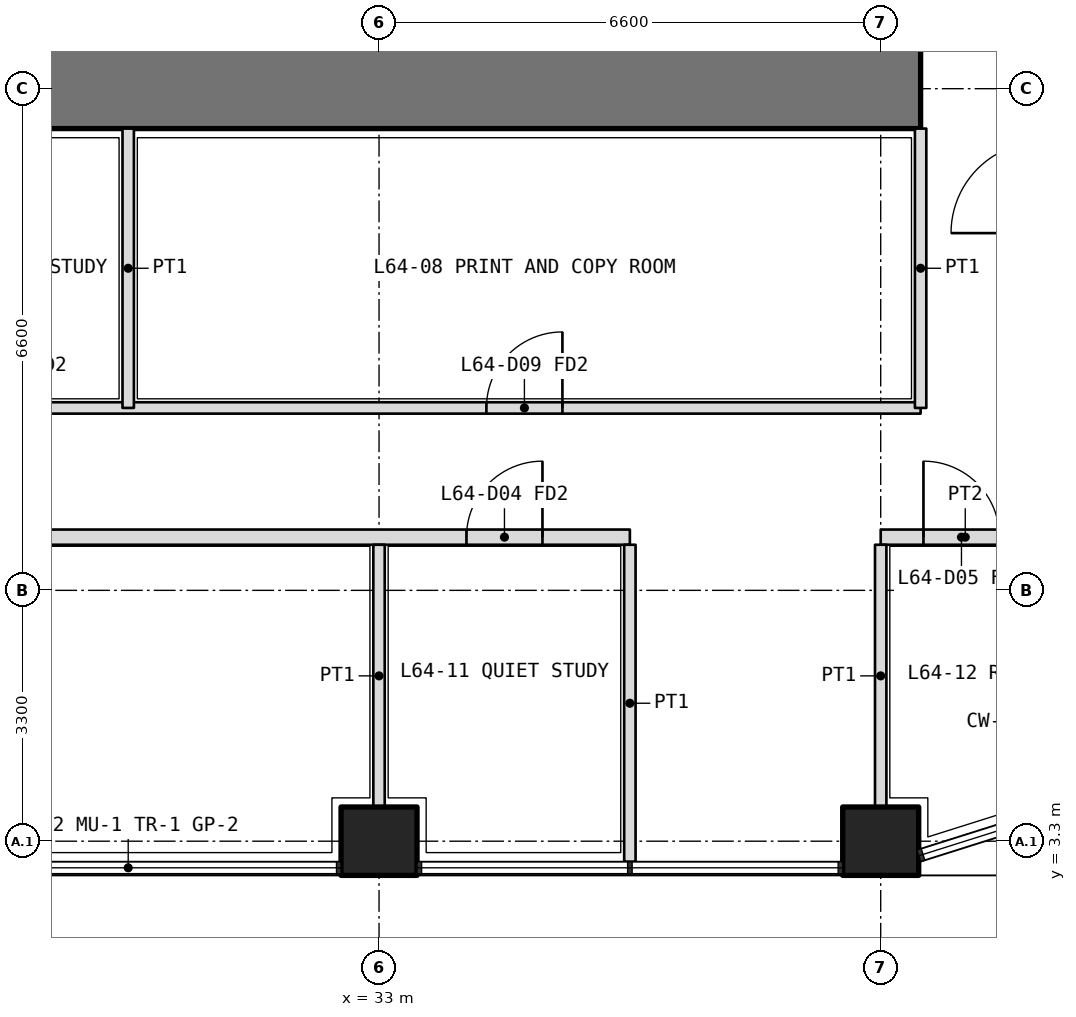
"""IFC4 building model, lengths in metres.
Left out: names, types, materials, properties, quantities, classifications, styles, units other than length and angle.
Written with IfcOpenShell. Run it as: python <this file> out.ifc"""

import sys

from ifc_helpers import new_model, si_unit, direction, frame, frame_2d, origin, origin_2d, place, context, subcontext, project, spatial, rectangle, extrude, element, fill, save


model = new_model("IFC4")
c1 = context("Model", 3, precision=1e-05, world=origin(), true_north=direction((0.0, 1.0)))
c2 = subcontext(c1, "Body", "Model", "MODEL_VIEW")
j1 = project(units=[si_unit("LENGTHUNIT", "METRE"), si_unit("PLANEANGLEUNIT", "RADIAN")], contexts=[c1])
p1 = place(None, origin())
s1 = spatial("IfcSite", under=j1, at=p1, CompositionType="ELEMENT")
p2 = place(p1, origin())
s2 = spatial("IfcBuilding", under=s1, at=p2, CompositionType="ELEMENT")
p3 = place(p2, frame((0.0, 0.0, 279.6)))
s3 = spatial("IfcBuildingStorey", under=s2, at=p3, CompositionType="ELEMENT", Elevation=279.6)
for number, where, z_axis, x_axis in (
    (1, (33.0, 3.3, 0.0), (0.0, 0.0, 1.0), (1.0, 0.0, 0.0)),
    (2, (39.6, 3.3, 0.0), (0.0, 0.0, 1.0), (1.0, 0.0, 0.0)),
):
    element("IfcColumn", number, at=place(p3, frame(where, z_axis=z_axis, x_axis=x_axis)), inside=s3, PredefinedType="COLUMN", context=c2, shape_type="SweptSolid", body=[
        extrude(rectangle(XDim=1.0, YDim=0.9, at=origin_2d()), origin(), (0.0, 0.0, 1.0), 4.2),
    ])
p4 = place(p3, frame((12.675, 13.2, 0.0), z_axis=(0.0, 0.0, 1.0), x_axis=(1.0, 0.0, 0.0)))
e3 = element("IfcWall", 3, at=p4, inside=s3, PredefinedType="SHEAR", context=c2, shape_type="SweptSolid", body=[
    extrude(rectangle(XDim=27.45, YDim=1.05, at=frame_2d((13.725, 0.0))), origin(), (0.0, 0.0, 1.0), 4.2),
])
p5 = place(p3, frame((12.675, 9.0, 0.0), z_axis=(0.0, 0.0, 1.0), x_axis=(1.0, 0.0, 0.0)))
e4 = element("IfcWall", 4, at=p5, inside=s3, PredefinedType="PARTITIONING", context=c2, shape_type="SweptSolid", body=[
    extrude(rectangle(XDim=27.45, YDim=0.15, at=frame_2d((13.725, 0.0))), origin(), (0.0, 0.0, 1.0), 3.0),
])
p6 = place(p5, frame((1.413, 0.0, 0.0)))
e5 = element("IfcOpeningElement", 5, at=p6, cuts=e4, PredefinedType="OPENING", context=c2, shape_type="SweptSolid", body=[
    extrude(rectangle(XDim=1.0, YDim=2.1, at=frame_2d((0.5, 1.05))), frame((0.0, 0.085, 0.0), z_axis=(0.0, -1.0, 0.0), x_axis=(1.0, 0.0, 0.0)), (0.0, 0.0, 1.0), 0.17),
])
p7 = place(p5, frame((8.275, 0.0, 0.0)))
e6 = element("IfcOpeningElement", 6, at=p7, cuts=e4, PredefinedType="OPENING", context=c2, shape_type="SweptSolid", body=[
    extrude(rectangle(XDim=1.0, YDim=2.1, at=frame_2d((0.5, 1.05))), frame((0.0, 0.085, 0.0), z_axis=(0.0, -1.0, 0.0), x_axis=(1.0, 0.0, 0.0)), (0.0, 0.0, 1.0), 0.17),
])
p8 = place(p5, frame((14.875, 0.0, 0.0)))
e7 = element("IfcOpeningElement", 7, at=p8, cuts=e4, PredefinedType="OPENING", context=c2, shape_type="SweptSolid", body=[
    extrude(rectangle(XDim=1.0, YDim=2.1, at=frame_2d((0.5, 1.05))), frame((0.0, 0.085, 0.0), z_axis=(0.0, -1.0, 0.0), x_axis=(1.0, 0.0, 0.0)), (0.0, 0.0, 1.0), 0.17),
])
p9 = place(p5, frame((21.738, 0.0, 0.0)))
e8 = element("IfcOpeningElement", 8, at=p9, cuts=e4, PredefinedType="OPENING", context=c2, shape_type="SweptSolid", body=[
    extrude(rectangle(XDim=1.0, YDim=2.1, at=frame_2d((0.5, 1.05))), frame((0.0, 0.085, 0.0), z_axis=(0.0, -1.0, 0.0), x_axis=(1.0, 0.0, 0.0)), (0.0, 0.0, 1.0), 0.17),
])
p10 = place(p3, frame((40.125, 12.675, 0.0), z_axis=(0.0, 0.0, 1.0), x_axis=(0.0, -1.0, 0.0)))
e9 = element("IfcWall", 9, at=p10, inside=s3, PredefinedType="PARTITIONING", context=c2, shape_type="SweptSolid", body=[
    extrude(rectangle(XDim=3.675, YDim=0.15, at=frame_2d((1.837, 0.0))), origin(), (0.0, 0.0, 1.0), 3.0),
])
p11 = place(p3, frame((29.7, 12.675, 0.0), z_axis=(0.0, 0.0, 1.0), x_axis=(0.0, -1.0, 0.0)))
e10 = element("IfcWall", 10, at=p11, inside=s3, PredefinedType="PARTITIONING", context=c2, shape_type="SweptSolid", body=[
    extrude(rectangle(XDim=3.675, YDim=0.15, at=frame_2d((1.837, 0.0))), origin(), (0.0, 0.0, 1.0), 3.9),
])
p12 = place(p3, frame((10.975, 7.3, 0.0), z_axis=(0.0, 0.0, 1.0), x_axis=(1.0, 0.0, 0.0)))
e11 = element("IfcWall", 11, at=p12, inside=s3, PredefinedType="PARTITIONING", context=c2, shape_type="SweptSolid", body=[
    extrude(rectangle(XDim=25.325, YDim=0.2, at=frame_2d((12.663, 0.0))), origin(), (0.0, 0.0, 1.0), 3.0),
])
p13 = place(p12, frame((0.562, 0.0, 0.0)))
e12 = element("IfcOpeningElement", 12, at=p13, cuts=e11, PredefinedType="OPENING", context=c2, shape_type="SweptSolid", body=[
    extrude(rectangle(XDim=1.2, YDim=2.1, at=frame_2d((0.6, 1.05))), frame((0.0, 0.11, 0.0), z_axis=(0.0, -1.0, 0.0), x_axis=(1.0, 0.0, 0.0)), (0.0, 0.0, 1.0), 0.22),
])
p14 = place(p12, frame((11.625, 0.0, 0.0)))
e13 = element("IfcOpeningElement", 13, at=p14, cuts=e11, PredefinedType="OPENING", context=c2, shape_type="SweptSolid", body=[
    extrude(rectangle(XDim=1.0, YDim=2.1, at=frame_2d((0.5, 1.05))), frame((0.0, 0.11, 0.0), z_axis=(0.0, -1.0, 0.0), x_axis=(1.0, 0.0, 0.0)), (0.0, 0.0, 1.0), 0.22),
])
p15 = place(p12, frame((23.175, 0.0, 0.0)))
e14 = element("IfcOpeningElement", 14, at=p15, cuts=e11, PredefinedType="OPENING", context=c2, shape_type="SweptSolid", body=[
    extrude(rectangle(XDim=1.0, YDim=2.1, at=frame_2d((0.5, 1.05))), frame((0.0, 0.11, 0.0), z_axis=(0.0, -1.0, 0.0), x_axis=(1.0, 0.0, 0.0)), (0.0, 0.0, 1.0), 0.22),
])
p16 = place(p3, frame((39.6, 7.3, 0.0), z_axis=(0.0, 0.0, 1.0), x_axis=(1.0, 0.0, 0.0)))
e15 = element("IfcWall", 15, at=p16, inside=s3, PredefinedType="PARTITIONING", context=c2, shape_type="SweptSolid", body=[
    extrude(rectangle(XDim=2.225, YDim=0.2, at=frame_2d((1.112, 0.0))), origin(), (0.0, 0.0, 1.0), 3.0),
])
p17 = place(p16, frame((0.562, 0.0, 0.0)))
e16 = element("IfcOpeningElement", 16, at=p17, cuts=e15, PredefinedType="OPENING", context=c2, shape_type="SweptSolid", body=[
    extrude(rectangle(XDim=1.0, YDim=2.1, at=frame_2d((0.5, 1.05))), frame((0.0, 0.11, 0.0), z_axis=(0.0, -1.0, 0.0), x_axis=(1.0, 0.0, 0.0)), (0.0, 0.0, 1.0), 0.22),
])
p18 = place(p3, frame((33.0, 3.75, 0.0), z_axis=(0.0, 0.0, 1.0), x_axis=(0.0, 1.0, 0.0)))
e17 = element("IfcWall", 17, at=p18, inside=s3, PredefinedType="PARTITIONING", context=c2, shape_type="SweptSolid", body=[
    extrude(rectangle(XDim=3.45, YDim=0.15, at=frame_2d((1.725, 0.0))), origin(), (0.0, 0.0, 1.0), 3.0),
])
p19 = place(p3, frame((36.3, 3.03, 0.0), z_axis=(0.0, 0.0, 1.0), x_axis=(0.0, 1.0, 0.0)))
e18 = element("IfcWall", 18, at=p19, inside=s3, PredefinedType="PARTITIONING", context=c2, shape_type="SweptSolid", body=[
    extrude(rectangle(XDim=4.17, YDim=0.15, at=frame_2d((2.085, 0.0))), origin(), (0.0, 0.0, 1.0), 2.7),
])
p20 = place(p3, frame((39.6, 3.75, 0.0), z_axis=(0.0, 0.0, 1.0), x_axis=(0.0, 1.0, 0.0)))
e19 = element("IfcWall", 19, at=p20, inside=s3, PredefinedType="PARTITIONING", context=c2, shape_type="SweptSolid", body=[
    extrude(rectangle(XDim=3.45, YDim=0.15, at=frame_2d((1.725, 0.0))), origin(), (0.0, 0.0, 1.0), 3.0),
])
p21 = place(p9, origin())
e20 = element("IfcDoor", 20, at=p21, inside=s3, OperationType="SINGLE_SWING_RIGHT", PredefinedType="DOOR", context=c2, shape_type="SweptSolid", body=[
    extrude(rectangle(XDim=1.0, YDim=2.1, at=frame_2d((0.5, 1.05))), frame((0.0, 0.025, 0.0), z_axis=(0.0, -1.0, 0.0), x_axis=(1.0, 0.0, 0.0)), (0.0, 0.0, 1.0), 0.05),
])
fill(e8, e20)
p22 = place(p15, origin())
e21 = element("IfcDoor", 21, at=p22, inside=s3, OperationType="SINGLE_SWING_RIGHT", PredefinedType="DOOR", context=c2, shape_type="SweptSolid", body=[
    extrude(rectangle(XDim=1.0, YDim=2.1, at=frame_2d((0.5, 1.05))), frame((0.0, 0.025, 0.0), z_axis=(0.0, -1.0, 0.0), x_axis=(1.0, 0.0, 0.0)), (0.0, 0.0, 1.0), 0.05),
])
fill(e14, e21)
p23 = place(p17, origin())
e22 = element("IfcDoor", 22, at=p23, inside=s3, OperationType="SINGLE_SWING_LEFT", PredefinedType="DOOR", context=c2, shape_type="SweptSolid", body=[
    extrude(rectangle(XDim=1.0, YDim=2.1, at=frame_2d((0.5, 1.05))), frame((0.0, 0.025, 0.0), z_axis=(0.0, -1.0, 0.0), x_axis=(1.0, 0.0, 0.0)), (0.0, 0.0, 1.0), 0.05),
])
fill(e16, e22)
save(model, sys.argv[1])
